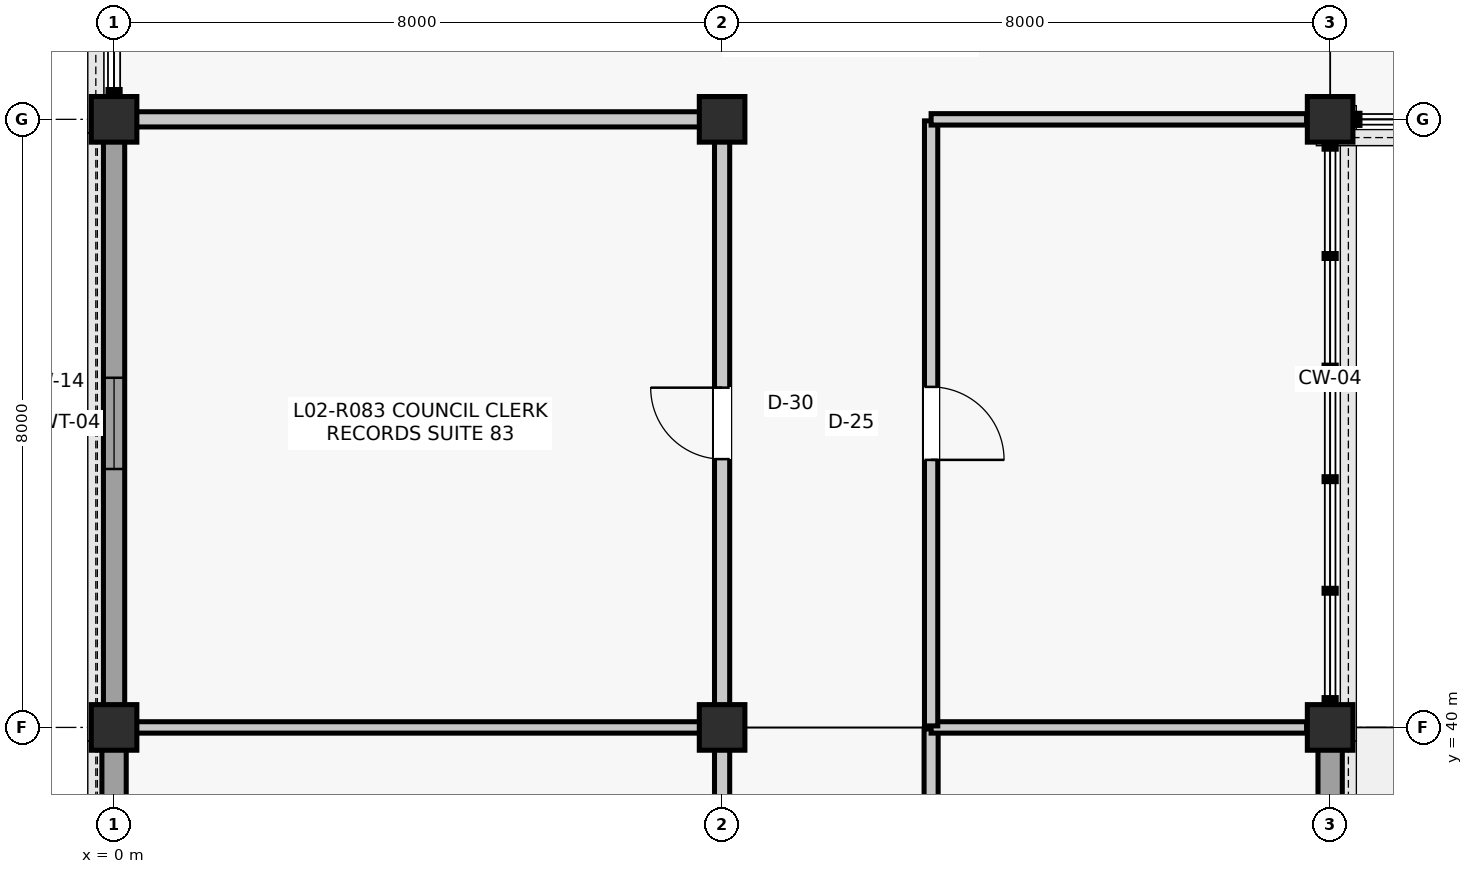
"""IFC4 building model, lengths in metres.
Left out: names, types, materials, properties, quantities, classifications, styles, units other than length and angle.
Written with IfcOpenShell. Run it as: python <this file> out.ifc"""

import sys

from ifc_helpers import new_model, si_unit, direction, frame, frame_2d, origin, origin_2d, place, context, subcontext, project, spatial, rectangle, extrude, element, fill, save


model = new_model("IFC4")
c1 = context("Model", 3, precision=1e-05, world=origin(), true_north=direction((0.0, 1.0)))
c2 = subcontext(c1, "Body", "Model", "MODEL_VIEW")
j1 = project(units=[si_unit("LENGTHUNIT", "METRE"), si_unit("PLANEANGLEUNIT", "RADIAN")], contexts=[c1])
p1 = place(None, origin())
s1 = spatial("IfcSite", under=j1, at=p1, CompositionType="ELEMENT")
p2 = place(p1, origin())
s2 = spatial("IfcBuilding", under=s1, at=p2, CompositionType="ELEMENT")
p3 = place(p2, frame((0.0, 0.0, 9.9)))
s3 = spatial("IfcBuildingStorey", under=s2, at=p3, CompositionType="ELEMENT", Elevation=9.9)
for number, where, z_axis, x_axis in (
    (1, (0.0, 40.0, 0.0), (0.0, 0.0, 1.0), (1.0, 0.0, 0.0)),
    (2, (0.0, 48.0, 0.0), (0.0, 0.0, 1.0), (1.0, 0.0, 0.0)),
    (3, (8.0, 40.0, 0.0), (0.0, 0.0, 1.0), (1.0, 0.0, 0.0)),
    (4, (8.0, 48.0, 0.0), (0.0, 0.0, 1.0), (1.0, 0.0, 0.0)),
    (5, (16.0, 40.0, 0.0), (0.0, 0.0, 1.0), (1.0, 0.0, 0.0)),
    (6, (16.0, 48.0, 0.0), (0.0, 0.0, 1.0), (1.0, 0.0, 0.0)),
):
    element("IfcColumn", number, at=place(p3, frame(where, z_axis=z_axis, x_axis=x_axis)), inside=s3, PredefinedType="COLUMN", context=c2, shape_type="SweptSolid", body=[
        extrude(rectangle(XDim=0.6, YDim=0.6, at=origin_2d()), origin(), (0.0, 0.0, 1.0), 3.96),
    ])
p4 = place(p3, frame((0.0, 32.285, 0.0), z_axis=(0.0, 0.0, 1.0), x_axis=(0.0, 1.0, 0.0)))
e7 = element("IfcWall", 7, at=p4, inside=s3, PredefinedType="SOLIDWALL", context=c2, shape_type="SweptSolid", body=[
    extrude(rectangle(XDim=7.43, YDim=0.32, at=frame_2d((3.715, 0.0))), origin(), (0.0, 0.0, 1.0), 3.299),
])
p5 = place(p4, frame((3.04, 0.0, 0.9)))
e8 = element("IfcOpeningElement", 8, at=p5, cuts=e7, PredefinedType="OPENING", context=c2, shape_type="SweptSolid", body=[
    extrude(rectangle(XDim=1.35, YDim=1.9, at=frame_2d((0.675, 0.95))), frame((0.0, 0.17, 0.0), z_axis=(0.0, -1.0, 0.0), x_axis=(1.0, 0.0, 0.0)), (0.0, 0.0, 1.0), 0.34),
])
p6 = place(p3, frame((0.0, 40.285, 0.0), z_axis=(0.0, 0.0, 1.0), x_axis=(0.0, 1.0, 0.0)))
e9 = element("IfcWall", 9, at=p6, inside=s3, PredefinedType="SOLIDWALL", context=c2, shape_type="SweptSolid", body=[
    extrude(rectangle(XDim=7.43, YDim=0.28, at=frame_2d((3.715, 0.0))), origin(), (0.0, 0.0, 1.0), 3.347),
])
p7 = place(p6, frame((3.115, 0.0, 0.9)))
e10 = element("IfcOpeningElement", 10, at=p7, cuts=e9, PredefinedType="OPENING", context=c2, shape_type="SweptSolid", body=[
    extrude(rectangle(XDim=1.2, YDim=1.8, at=frame_2d((0.6, 0.9))), frame((0.0, 0.15, 0.0), z_axis=(0.0, -1.0, 0.0), x_axis=(1.0, 0.0, 0.0)), (0.0, 0.0, 1.0), 0.3),
])
p8 = place(p3, frame((16.0, 32.285, 0.0), z_axis=(0.0, 0.0, 1.0), x_axis=(0.0, 1.0, 0.0)))
e11 = element("IfcWall", 11, at=p8, inside=s3, PredefinedType="SOLIDWALL", context=c2, shape_type="SweptSolid", body=[
    extrude(rectangle(XDim=7.43, YDim=0.32, at=frame_2d((3.715, 0.0))), origin(), (0.0, 0.0, 1.0), 3.295),
])
p9 = place(p8, frame((3.115, 0.0, 0.9)))
e12 = element("IfcOpeningElement", 12, at=p9, cuts=e11, PredefinedType="OPENING", context=c2, shape_type="SweptSolid", body=[
    extrude(rectangle(XDim=1.2, YDim=1.8, at=frame_2d((0.6, 0.9))), frame((0.0, 0.17, 0.0), z_axis=(0.0, -1.0, 0.0), x_axis=(1.0, 0.0, 0.0)), (0.0, 0.0, 1.0), 0.34),
])
p10 = place(p3, frame((10.75, 32.02, 0.0), z_axis=(0.0, 0.0, 1.0), x_axis=(0.0, 1.0, 0.0)))
e13 = element("IfcWall", 13, at=p10, inside=s3, PredefinedType="PARTITIONING", context=c2, shape_type="SweptSolid", body=[
    extrude(rectangle(XDim=7.96, YDim=0.185, at=frame_2d((3.98, 0.0))), origin(), (0.0, 0.0, 1.0), 3.141),
])
p11 = place(p10, frame((3.46, 0.0, 0.0)))
e14 = element("IfcOpeningElement", 14, at=p11, cuts=e13, PredefinedType="OPENING", context=c2, shape_type="SweptSolid", body=[
    extrude(rectangle(XDim=1.04, YDim=2.18, at=frame_2d((0.52, 1.09))), frame((0.0, 0.103, 0.0), z_axis=(0.0, -1.0, 0.0), x_axis=(1.0, 0.0, 0.0)), (0.0, 0.0, 1.0), 0.205),
])
p12 = place(p3, frame((10.75, 40.0, 0.0), z_axis=(0.0, 0.0, 1.0), x_axis=(1.0, 0.0, 0.0)))
e15 = element("IfcWall", 15, at=p12, inside=s3, PredefinedType="PARTITIONING", context=c2, shape_type="SweptSolid", body=[
    extrude(rectangle(XDim=4.94, YDim=0.15, at=frame_2d((2.47, 0.0))), origin(), (0.0, 0.0, 1.0), 3.141),
])
p13 = place(p3, frame((10.75, 40.02, 0.0), z_axis=(0.0, 0.0, 1.0), x_axis=(0.0, 1.0, 0.0)))
e16 = element("IfcWall", 16, at=p13, inside=s3, PredefinedType="PARTITIONING", context=c2, shape_type="SweptSolid", body=[
    extrude(rectangle(XDim=7.96, YDim=0.175, at=frame_2d((3.98, 0.0))), origin(), (0.0, 0.0, 1.0), 3.141),
])
p14 = place(p13, frame((3.5, 0.0, 0.0)))
e17 = element("IfcOpeningElement", 17, at=p14, cuts=e16, PredefinedType="OPENING", context=c2, shape_type="SweptSolid", body=[
    extrude(rectangle(XDim=0.96, YDim=2.14, at=frame_2d((0.48, 1.07))), frame((0.0, 0.097, 0.0), z_axis=(0.0, -1.0, 0.0), x_axis=(1.0, 0.0, 0.0)), (0.0, 0.0, 1.0), 0.195),
])
p15 = place(p3, frame((10.75, 48.0, 0.0), z_axis=(0.0, 0.0, 1.0), x_axis=(1.0, 0.0, 0.0)))
e18 = element("IfcWall", 18, at=p15, inside=s3, PredefinedType="PARTITIONING", context=c2, shape_type="SweptSolid", body=[
    extrude(rectangle(XDim=4.94, YDim=0.15, at=frame_2d((2.47, 0.0))), origin(), (0.0, 0.0, 1.0), 3.151),
])
p16 = place(p3, frame((8.0, 32.29, 0.0), z_axis=(0.0, 0.0, 1.0), x_axis=(0.0, 1.0, 0.0)))
e19 = element("IfcWall", 19, at=p16, inside=s3, PredefinedType="PARTITIONING", context=c2, shape_type="SweptSolid", body=[
    extrude(rectangle(XDim=7.42, YDim=0.2, at=frame_2d((3.71, 0.0))), origin(), (0.0, 0.0, 1.0), 3.242),
])
p17 = place(p16, frame((2.76, 0.0, 0.0)))
e20 = element("IfcOpeningElement", 20, at=p17, cuts=e19, PredefinedType="OPENING", context=c2, shape_type="SweptSolid", body=[
    extrude(rectangle(XDim=1.9, YDim=2.38, at=frame_2d((0.95, 1.19))), frame((0.0, 0.11, 0.0), z_axis=(0.0, -1.0, 0.0), x_axis=(1.0, 0.0, 0.0)), (0.0, 0.0, 1.0), 0.22),
])
p18 = place(p3, frame((0.29, 40.0, 0.0), z_axis=(0.0, 0.0, 1.0), x_axis=(1.0, 0.0, 0.0)))
e21 = element("IfcWall", 21, at=p18, inside=s3, PredefinedType="PARTITIONING", context=c2, shape_type="SweptSolid", body=[
    extrude(rectangle(XDim=7.42, YDim=0.15, at=frame_2d((3.71, 0.0))), origin(), (0.0, 0.0, 1.0), 3.157),
])
p19 = place(p3, frame((8.0, 40.29, 0.0), z_axis=(0.0, 0.0, 1.0), x_axis=(0.0, 1.0, 0.0)))
e22 = element("IfcWall", 22, at=p19, inside=s3, PredefinedType="PARTITIONING", context=c2, shape_type="SweptSolid", body=[
    extrude(rectangle(XDim=7.42, YDim=0.2, at=frame_2d((3.71, 0.0))), origin(), (0.0, 0.0, 1.0), 3.151),
])
p20 = place(p19, frame((3.24, 0.0, 0.0)))
e23 = element("IfcOpeningElement", 23, at=p20, cuts=e22, PredefinedType="OPENING", context=c2, shape_type="SweptSolid", body=[
    extrude(rectangle(XDim=0.94, YDim=2.12, at=frame_2d((0.47, 1.06))), frame((0.0, 0.11, 0.0), z_axis=(0.0, -1.0, 0.0), x_axis=(1.0, 0.0, 0.0)), (0.0, 0.0, 1.0), 0.22),
])
p21 = place(p3, frame((0.29, 48.0, 0.0), z_axis=(0.0, 0.0, 1.0), x_axis=(1.0, 0.0, 0.0)))
e24 = element("IfcWall", 24, at=p21, inside=s3, PredefinedType="PARTITIONING", context=c2, shape_type="SweptSolid", body=[
    extrude(rectangle(XDim=7.42, YDim=0.2, at=frame_2d((3.71, 0.0))), origin(), (0.0, 0.0, 1.0), 3.141),
])
p22 = place(p7, origin())
e25 = element("IfcWindow", 25, at=p22, inside=s3, PartitioningType="SINGLE_PANEL", PredefinedType="WINDOW", context=c2, shape_type="SweptSolid", body=[
    extrude(rectangle(XDim=1.2, YDim=1.8, at=frame_2d((0.6, 0.9))), frame((0.0, 0.03, 0.0), z_axis=(0.0, -1.0, 0.0), x_axis=(1.0, 0.0, 0.0)), (0.0, 0.0, 1.0), 0.06),
])
fill(e10, e25)
p23 = place(p14, frame((0.96, 0.0, 0.0), z_axis=(0.0, 0.0, 1.0), x_axis=(-1.0, 0.0, 0.0)))
e26 = element("IfcDoor", 26, at=p23, inside=s3, OperationType="SINGLE_SWING_LEFT", PredefinedType="DOOR", context=c2, shape_type="SweptSolid", body=[
    extrude(rectangle(XDim=0.96, YDim=2.14, at=frame_2d((0.48, 1.07))), frame((0.0, 0.025, 0.0), z_axis=(0.0, -1.0, 0.0), x_axis=(1.0, 0.0, 0.0)), (0.0, 0.0, 1.0), 0.05),
])
fill(e17, e26)
p24 = place(p20, origin())
e27 = element("IfcDoor", 27, at=p24, inside=s3, OperationType="SINGLE_SWING_RIGHT", PredefinedType="DOOR", context=c2, shape_type="SweptSolid", body=[
    extrude(rectangle(XDim=0.94, YDim=2.12, at=frame_2d((0.47, 1.06))), frame((0.0, 0.025, 0.0), z_axis=(0.0, -1.0, 0.0), x_axis=(1.0, 0.0, 0.0)), (0.0, 0.0, 1.0), 0.05),
])
fill(e23, e27)
save(model, sys.argv[1])
